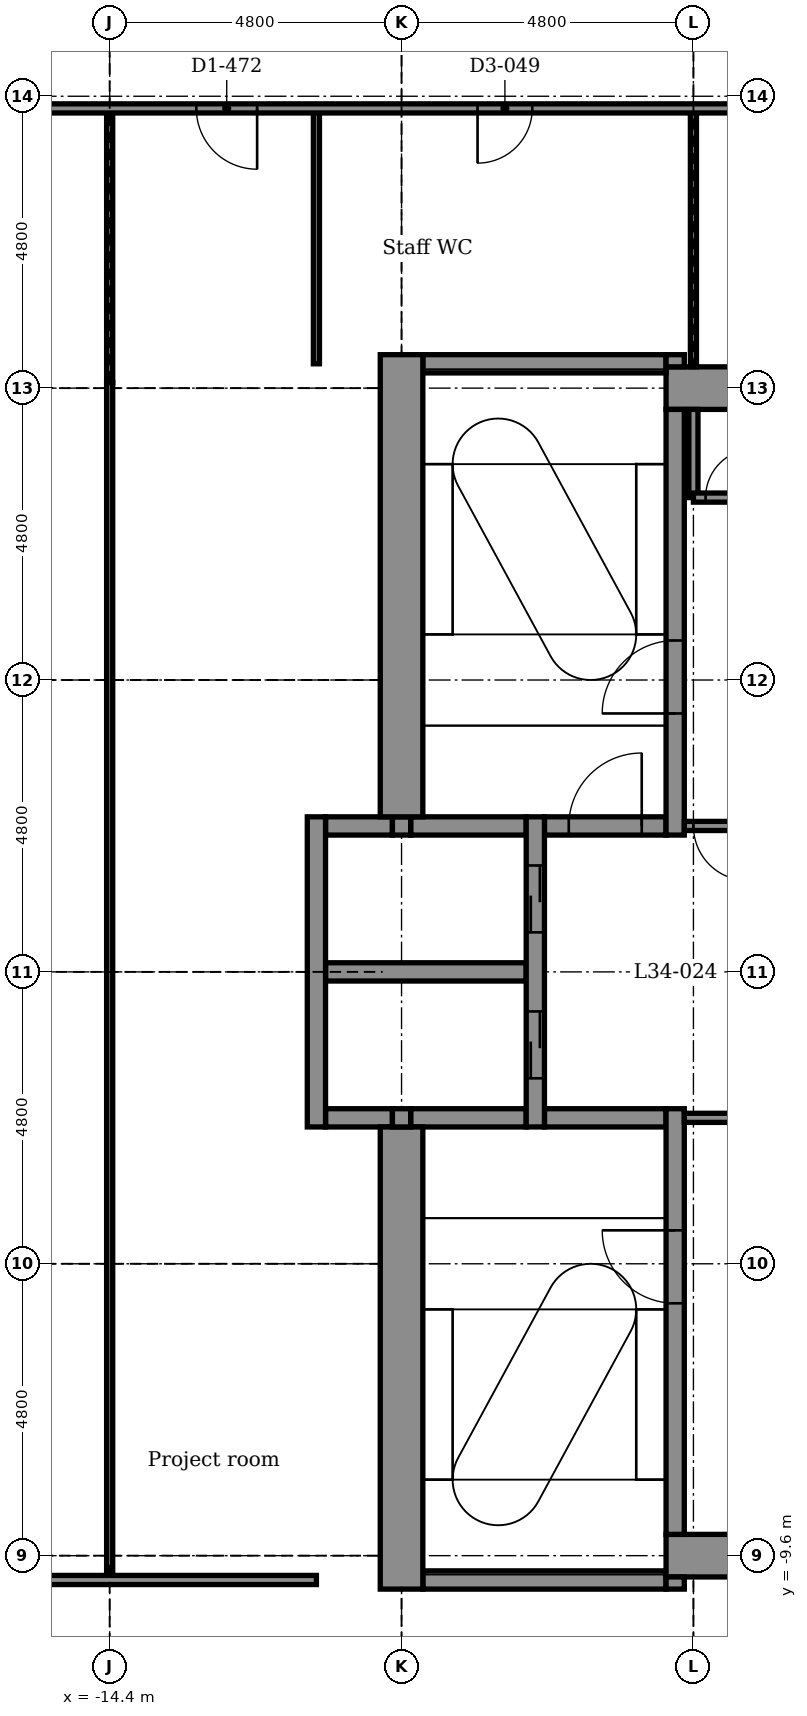
"""IFC4 building model, lengths in metres.
Left out: names, types, materials, properties, quantities, classifications, styles, units other than length and angle.
Written with IfcOpenShell. Run it as: python <this file> out.ifc"""

import sys

from ifc_helpers import new_model, si_unit, direction, frame, frame_2d, origin, place, context, subcontext, project, spatial, rectangle, extrude, element, fill, save


model = new_model("IFC4")
c1 = context("Model", 3, precision=1e-05, world=origin(), true_north=direction((0.0, 1.0)))
c2 = subcontext(c1, "Body", "Model", "MODEL_VIEW")
j1 = project(units=[si_unit("LENGTHUNIT", "METRE"), si_unit("PLANEANGLEUNIT", "RADIAN")], contexts=[c1])
p1 = place(None, origin())
s1 = spatial("IfcSite", under=j1, at=p1, CompositionType="ELEMENT")
p2 = place(p1, origin())
s2 = spatial("IfcBuilding", under=s1, at=p2, CompositionType="ELEMENT")
p3 = place(p2, frame((0.0, 0.0, 166.1)))
s3 = spatial("IfcBuildingStorey", under=s2, at=p3, CompositionType="ELEMENT", Elevation=166.1)
p4 = place(p3, frame((-9.25, -10.0, -0.15), z_axis=(0.0, 0.0, 1.0), x_axis=(1.0, 0.0, 0.0)))
e1 = element("IfcWall", 1, at=p4, inside=s3, PredefinedType="STANDARD", context=c2, shape_type="SweptSolid", body=[
    extrude(rectangle(XDim=4.0, YDim=0.3, at=frame_2d((2.0, 0.0))), origin(), (0.0, 0.0, 1.0), 3.9),
])
p5 = place(p3, frame((-5.25, -9.6, -0.15), z_axis=(0.0, 0.0, 1.0), x_axis=(1.0, 0.0, 0.0)))
e2 = element("IfcWall", 2, at=p5, inside=s3, PredefinedType="SHEAR", context=c2, shape_type="SweptSolid", body=[
    extrude(rectangle(XDim=10.2, YDim=0.7, at=frame_2d((5.1, 0.0))), origin(), (0.0, 0.0, 1.0), 3.9),
])
p6 = place(p5, frame((9.0, 0.0, 0.15)))
e3 = element("IfcOpeningElement", 3, at=p6, cuts=e2, PredefinedType="OPENING", context=c2, shape_type="SweptSolid", body=[
    extrude(rectangle(XDim=0.9, YDim=2.1, at=frame_2d((0.45, 1.05))), frame((0.0, 0.36, 0.0), z_axis=(0.0, -1.0, 0.0), x_axis=(1.0, 0.0, 0.0)), (0.0, 0.0, 1.0), 0.72),
])
p7 = place(p3, frame((-10.85, -2.4, -0.15), z_axis=(0.0, 0.0, 1.0), x_axis=(1.0, 0.0, 0.0)))
e4 = element("IfcWall", 4, at=p7, inside=s3, PredefinedType="STANDARD", context=c2, shape_type="SweptSolid", body=[
    extrude(rectangle(XDim=1.1, YDim=0.3, at=frame_2d((0.55, 0.0))), origin(), (0.0, 0.0, 1.0), 3.9),
])
p8 = place(p3, frame((-9.45, -2.4, -0.15), z_axis=(0.0, 0.0, 1.0), x_axis=(1.0, 0.0, 0.0)))
e5 = element("IfcWall", 5, at=p8, inside=s3, PredefinedType="STANDARD", context=c2, shape_type="SweptSolid", body=[
    extrude(rectangle(XDim=1.9, YDim=0.3, at=frame_2d((0.95, 0.0))), origin(), (0.0, 0.0, 1.0), 3.9),
])
p9 = place(p3, frame((-7.25, -2.4, -0.15), z_axis=(0.0, 0.0, 1.0), x_axis=(1.0, 0.0, 0.0)))
e6 = element("IfcWall", 6, at=p9, inside=s3, PredefinedType="STANDARD", context=c2, shape_type="SweptSolid", body=[
    extrude(rectangle(XDim=2.0, YDim=0.3, at=frame_2d((1.0, 0.0))), origin(), (0.0, 0.0, 1.0), 3.9),
])
p10 = place(p3, frame((-10.85, 0.0, -0.15), z_axis=(0.0, 0.0, 1.0), x_axis=(1.0, 0.0, 0.0)))
e7 = element("IfcWall", 7, at=p10, inside=s3, PredefinedType="STANDARD", context=c2, shape_type="SweptSolid", body=[
    extrude(rectangle(XDim=3.3, YDim=0.3, at=frame_2d((1.65, 0.0))), origin(), (0.0, 0.0, 1.0), 3.9),
])
p11 = place(p3, frame((-10.85, 2.4, -0.15), z_axis=(0.0, 0.0, 1.0), x_axis=(1.0, 0.0, 0.0)))
e8 = element("IfcWall", 8, at=p11, inside=s3, PredefinedType="STANDARD", context=c2, shape_type="SweptSolid", body=[
    extrude(rectangle(XDim=1.1, YDim=0.3, at=frame_2d((0.55, 0.0))), origin(), (0.0, 0.0, 1.0), 3.9),
])
p12 = place(p3, frame((-9.45, 2.4, -0.15), z_axis=(0.0, 0.0, 1.0), x_axis=(1.0, 0.0, 0.0)))
e9 = element("IfcWall", 9, at=p12, inside=s3, PredefinedType="STANDARD", context=c2, shape_type="SweptSolid", body=[
    extrude(rectangle(XDim=1.9, YDim=0.3, at=frame_2d((0.95, 0.0))), origin(), (0.0, 0.0, 1.0), 3.9),
])
p13 = place(p3, frame((-7.25, 2.4, -0.15), z_axis=(0.0, 0.0, 1.0), x_axis=(1.0, 0.0, 0.0)))
e10 = element("IfcWall", 10, at=p13, inside=s3, PredefinedType="STANDARD", context=c2, shape_type="SweptSolid", body=[
    extrude(rectangle(XDim=2.0, YDim=0.3, at=frame_2d((1.0, 0.0))), origin(), (0.0, 0.0, 1.0), 3.9),
])
p14 = place(p13, frame((0.4, 0.0, 0.15)))
e11 = element("IfcOpeningElement", 11, at=p14, cuts=e10, PredefinedType="OPENING", context=c2, shape_type="SweptSolid", body=[
    extrude(rectangle(XDim=1.2, YDim=2.1, at=frame_2d((0.6, 1.05))), frame((0.0, 0.16, 0.0), z_axis=(0.0, -1.0, 0.0), x_axis=(1.0, 0.0, 0.0)), (0.0, 0.0, 1.0), 0.32),
])
p15 = place(p3, frame((-5.25, 9.6, -0.15), z_axis=(0.0, 0.0, 1.0), x_axis=(1.0, 0.0, 0.0)))
e12 = element("IfcWall", 12, at=p15, inside=s3, PredefinedType="SHEAR", context=c2, shape_type="SweptSolid", body=[
    extrude(rectangle(XDim=14.5, YDim=0.7, at=frame_2d((7.25, 0.0))), origin(), (0.0, 0.0, 1.0), 3.9),
])
p16 = place(p15, frame((9.35, 0.0, 0.15)))
e13 = element("IfcOpeningElement", 13, at=p16, cuts=e12, PredefinedType="OPENING", context=c2, shape_type="SweptSolid", body=[
    extrude(rectangle(XDim=1.4, YDim=2.1, at=frame_2d((0.7, 1.05))), frame((0.0, 0.36, 0.0), z_axis=(0.0, -1.0, 0.0), x_axis=(1.0, 0.0, 0.0)), (0.0, 0.0, 1.0), 0.72),
])
p17 = place(p3, frame((-9.25, 10.0, -0.15), z_axis=(0.0, 0.0, 1.0), x_axis=(1.0, 0.0, 0.0)))
e14 = element("IfcWall", 14, at=p17, inside=s3, PredefinedType="STANDARD", context=c2, shape_type="SweptSolid", body=[
    extrude(rectangle(XDim=4.0, YDim=0.3, at=frame_2d((2.0, 0.0))), origin(), (0.0, 0.0, 1.0), 3.9),
])
p18 = place(p3, frame((-11.0, -2.55, -0.15), z_axis=(0.0, 0.0, 1.0), x_axis=(0.0, 1.0, 0.0)))
e15 = element("IfcWall", 15, at=p18, inside=s3, PredefinedType="STANDARD", context=c2, shape_type="SweptSolid", body=[
    extrude(rectangle(XDim=5.1, YDim=0.3, at=frame_2d((2.55, 0.0))), origin(), (0.0, 0.0, 1.0), 3.9),
])
p19 = place(p3, frame((-9.6, -10.15, -0.15), z_axis=(0.0, 0.0, 1.0), x_axis=(0.0, 1.0, 0.0)))
e16 = element("IfcWall", 16, at=p19, inside=s3, PredefinedType="SHEAR", context=c2, shape_type="SweptSolid", body=[
    extrude(rectangle(XDim=7.6, YDim=0.7, at=frame_2d((3.8, 0.0))), origin(), (0.0, 0.0, 1.0), 3.9),
])
for number, where, z_axis, x_axis in (
    (17, (-9.6, -2.55, -0.15), (0.0, 0.0, 1.0), (0.0, 1.0, 0.0)),
    (18, (-9.6, 2.25, -0.15), (0.0, 0.0, 1.0), (0.0, 1.0, 0.0)),
):
    element("IfcWall", number, at=place(p3, frame(where, z_axis=z_axis, x_axis=x_axis)), inside=s3, PredefinedType="STANDARD", context=c2, shape_type="SweptSolid", body=[
        extrude(rectangle(XDim=0.3, YDim=0.3, at=frame_2d((0.15, 0.0))), origin(), (0.0, 0.0, 1.0), 3.9),
    ])
p20 = place(p3, frame((-9.6, 2.55, -0.15), z_axis=(0.0, 0.0, 1.0), x_axis=(0.0, 1.0, 0.0)))
e19 = element("IfcWall", 19, at=p20, inside=s3, PredefinedType="SHEAR", context=c2, shape_type="SweptSolid", body=[
    extrude(rectangle(XDim=7.6, YDim=0.7, at=frame_2d((3.8, 0.0))), origin(), (0.0, 0.0, 1.0), 3.9),
])
p21 = place(p3, frame((-7.4, -2.55, -0.15), z_axis=(0.0, 0.0, 1.0), x_axis=(0.0, 1.0, 0.0)))
e20 = element("IfcWall", 20, at=p21, inside=s3, PredefinedType="STANDARD", context=c2, shape_type="SweptSolid", body=[
    extrude(rectangle(XDim=5.1, YDim=0.3, at=frame_2d((2.55, 0.0))), origin(), (0.0, 0.0, 1.0), 3.9),
])
p22 = place(p21, frame((0.8, 0.0, 0.15)))
e21 = element("IfcOpeningElement", 21, at=p22, cuts=e20, PredefinedType="OPENING", context=c2, shape_type="SweptSolid", body=[
    extrude(rectangle(XDim=1.1, YDim=2.1, at=frame_2d((0.55, 1.05))), frame((0.0, 0.16, 0.0), z_axis=(0.0, -1.0, 0.0), x_axis=(1.0, 0.0, 0.0)), (0.0, 0.0, 1.0), 0.32),
])
p23 = place(p21, frame((3.2, 0.0, 0.15)))
e22 = element("IfcOpeningElement", 22, at=p23, cuts=e20, PredefinedType="OPENING", context=c2, shape_type="SweptSolid", body=[
    extrude(rectangle(XDim=1.1, YDim=2.1, at=frame_2d((0.55, 1.05))), frame((0.0, 0.16, 0.0), z_axis=(0.0, -1.0, 0.0), x_axis=(1.0, 0.0, 0.0)), (0.0, 0.0, 1.0), 0.32),
])
p24 = place(p3, frame((-5.1, -10.15, -0.15), z_axis=(0.0, 0.0, 1.0), x_axis=(0.0, 1.0, 0.0)))
e23 = element("IfcWall", 23, at=p24, inside=s3, PredefinedType="STANDARD", context=c2, shape_type="SweptSolid", body=[
    extrude(rectangle(XDim=0.2, YDim=0.3, at=frame_2d((0.1, 0.0))), origin(), (0.0, 0.0, 1.0), 3.9),
])
p25 = place(p3, frame((-5.1, -9.25, -0.15), z_axis=(0.0, 0.0, 1.0), x_axis=(0.0, 1.0, 0.0)))
e24 = element("IfcWall", 24, at=p25, inside=s3, PredefinedType="STANDARD", context=c2, shape_type="SweptSolid", body=[
    extrude(rectangle(XDim=7.0, YDim=0.3, at=frame_2d((3.5, 0.0))), origin(), (0.0, 0.0, 1.0), 3.9),
])
p26 = place(p25, frame((3.8, 0.0, 0.15)))
e25 = element("IfcOpeningElement", 25, at=p26, cuts=e24, PredefinedType="OPENING", context=c2, shape_type="SweptSolid", body=[
    extrude(rectangle(XDim=1.2, YDim=2.1, at=frame_2d((0.6, 1.05))), frame((0.0, 0.16, 0.0), z_axis=(0.0, -1.0, 0.0), x_axis=(1.0, 0.0, 0.0)), (0.0, 0.0, 1.0), 0.32),
])
p27 = place(p3, frame((-5.1, 2.25, -0.15), z_axis=(0.0, 0.0, 1.0), x_axis=(0.0, 1.0, 0.0)))
e26 = element("IfcWall", 26, at=p27, inside=s3, PredefinedType="STANDARD", context=c2, shape_type="SweptSolid", body=[
    extrude(rectangle(XDim=7.0, YDim=0.3, at=frame_2d((3.5, 0.0))), origin(), (0.0, 0.0, 1.0), 3.9),
])
p28 = place(p27, frame((2.0, 0.0, 0.15)))
e27 = element("IfcOpeningElement", 27, at=p28, cuts=e26, PredefinedType="OPENING", context=c2, shape_type="SweptSolid", body=[
    extrude(rectangle(XDim=1.2, YDim=2.1, at=frame_2d((0.6, 1.05))), frame((0.0, 0.16, 0.0), z_axis=(0.0, -1.0, 0.0), x_axis=(1.0, 0.0, 0.0)), (0.0, 0.0, 1.0), 0.32),
])
p29 = place(p3, frame((-5.1, 9.95, -0.15), z_axis=(0.0, 0.0, 1.0), x_axis=(0.0, 1.0, 0.0)))
e28 = element("IfcWall", 28, at=p29, inside=s3, PredefinedType="STANDARD", context=c2, shape_type="SweptSolid", body=[
    extrude(rectangle(XDim=0.2, YDim=0.3, at=frame_2d((0.1, 0.0))), origin(), (0.0, 0.0, 1.0), 3.9),
])
p30 = place(p3, frame((-4.8, 9.95, 0.0), z_axis=(0.0, 0.0, 1.0), x_axis=(0.0, 1.0, 0.0)))
e29 = element("IfcWall", 29, at=p30, inside=s3, PredefinedType="PARTITIONING", context=c2, shape_type="SweptSolid", body=[
    extrude(rectangle(XDim=4.25, YDim=0.1, at=frame_2d((2.125, 0.0))), origin(), (0.0, 0.0, 1.0), 3.066),
])
p31 = place(p3, frame((-4.8, 7.8, 0.0), z_axis=(0.0, 0.0, 1.0), x_axis=(0.0, 1.0, 0.0)))
e30 = element("IfcWall", 30, at=p31, inside=s3, PredefinedType="PARTITIONING", context=c2, shape_type="SweptSolid", body=[
    extrude(rectangle(XDim=1.45, YDim=0.15, at=frame_2d((0.725, 0.0))), origin(), (0.0, 0.0, 1.0), 3.75),
])
p32 = place(p3, frame((-11.0, 10.0, 0.0), z_axis=(0.0, 0.0, 1.0), x_axis=(0.0, 1.0, 0.0)))
e31 = element("IfcWall", 31, at=p32, inside=s3, PredefinedType="PARTITIONING", context=c2, shape_type="SweptSolid", body=[
    extrude(rectangle(XDim=4.2, YDim=0.1, at=frame_2d((2.1, 0.0))), origin(), (0.0, 0.0, 1.0), 3.75),
])
p33 = place(p3, frame((-14.4, -10.0, 0.0), z_axis=(0.0, 0.0, 1.0), x_axis=(0.0, 1.0, 0.0)))
e32 = element("IfcWall", 32, at=p33, inside=s3, PredefinedType="PARTITIONING", context=c2, shape_type="SweptSolid", body=[
    extrude(rectangle(XDim=19.694, YDim=0.1, at=frame_2d((9.847, 0.0))), origin(), (0.0, 0.0, 1.0), 3.75),
])
p34 = place(p3, frame((-14.4, 9.694, 0.0), z_axis=(0.0, 0.0, 1.0), x_axis=(0.0, 1.0, 0.0)))
e33 = element("IfcWall", 33, at=p34, inside=s3, PredefinedType="PARTITIONING", context=c2, shape_type="SweptSolid", body=[
    extrude(rectangle(XDim=4.506, YDim=0.1, at=frame_2d((2.253, 0.0))), origin(), (0.0, 0.0, 1.0), 3.066),
])
p35 = place(p3, frame((-21.156, -10.0, 0.0), z_axis=(0.0, 0.0, 1.0), x_axis=(1.0, 0.0, 0.0)))
e34 = element("IfcWall", 34, at=p35, inside=s3, PredefinedType="PARTITIONING", context=c2, shape_type="SweptSolid", body=[
    extrude(rectangle(XDim=10.156, YDim=0.15, at=frame_2d((5.078, 0.0))), origin(), (0.0, 0.0, 1.0), 3.75),
])
p36 = place(p35, frame((1.735, 0.0, 0.0)))
e35 = element("IfcOpeningElement", 35, at=p36, cuts=e34, PredefinedType="OPENING", context=c2, shape_type="SweptSolid", body=[
    extrude(rectangle(XDim=1.8, YDim=2.1, at=frame_2d((0.9, 1.05))), frame((0.0, 0.085, 0.0), z_axis=(0.0, -1.0, 0.0), x_axis=(1.0, 0.0, 0.0)), (0.0, 0.0, 1.0), 0.17),
])
p37 = place(p3, frame((-4.8, 7.8, 0.0), z_axis=(0.0, 0.0, 1.0), x_axis=(1.0, 0.0, 0.0)))
e36 = element("IfcWall", 36, at=p37, inside=s3, PredefinedType="PARTITIONING", context=c2, shape_type="SweptSolid", body=[
    extrude(rectangle(XDim=1.05, YDim=0.15, at=frame_2d((0.525, 0.0))), origin(), (0.0, 0.0, 1.0), 3.75),
])
p38 = place(p37, frame((0.2, 0.0, 0.0)))
e37 = element("IfcOpeningElement", 37, at=p38, cuts=e36, PredefinedType="OPENING", context=c2, shape_type="SweptSolid", body=[
    extrude(rectangle(XDim=0.8, YDim=2.1, at=frame_2d((0.4, 1.05))), frame((0.0, 0.085, 0.0), z_axis=(0.0, -1.0, 0.0), x_axis=(1.0, 0.0, 0.0)), (0.0, 0.0, 1.0), 0.17),
])
p39 = place(p3, frame((-18.731, 14.2, 0.0), z_axis=(0.0, 0.0, 1.0), x_axis=(1.0, 0.0, 0.0)))
e38 = element("IfcWall", 38, at=p39, inside=s3, PredefinedType="PARTITIONING", context=c2, shape_type="SweptSolid", body=[
    extrude(rectangle(XDim=22.331, YDim=0.15, at=frame_2d((11.166, 0.0))), origin(), (0.0, 0.0, 1.0), 3.75),
])
p40 = place(p39, frame((10.381, 0.0, 0.0)))
e39 = element("IfcOpeningElement", 39, at=p40, cuts=e38, PredefinedType="OPENING", context=c2, shape_type="SweptSolid", body=[
    extrude(rectangle(XDim=0.9, YDim=2.1, at=frame_2d((0.45, 1.05))), frame((0.0, 0.085, 0.0), z_axis=(0.0, -1.0, 0.0), x_axis=(1.0, 0.0, 0.0)), (0.0, 0.0, 1.0), 0.17),
])
p41 = place(p39, frame((15.881, 0.0, 0.0)))
e40 = element("IfcOpeningElement", 40, at=p41, cuts=e38, PredefinedType="OPENING", context=c2, shape_type="SweptSolid", body=[
    extrude(rectangle(XDim=0.9, YDim=2.1, at=frame_2d((0.45, 1.05))), frame((0.0, 0.085, 0.0), z_axis=(0.0, -1.0, 0.0), x_axis=(1.0, 0.0, 0.0)), (0.0, 0.0, 1.0), 0.17),
])
p42 = place(p39, frame((5.756, 0.0, 0.0)))
e41 = element("IfcOpeningElement", 41, at=p42, cuts=e38, PredefinedType="OPENING", context=c2, shape_type="SweptSolid", body=[
    extrude(rectangle(XDim=1.0, YDim=2.1, at=frame_2d((0.5, 1.05))), frame((0.0, 0.085, 0.0), z_axis=(0.0, -1.0, 0.0), x_axis=(1.0, 0.0, 0.0)), (0.0, 0.0, 1.0), 0.17),
])
p43 = place(p3, frame((-4.95, 2.4, 0.0), z_axis=(0.0, 0.0, 1.0), x_axis=(1.0, 0.0, 0.0)))
e42 = element("IfcWall", 42, at=p43, inside=s3, PredefinedType="PARTITIONING", context=c2, shape_type="SweptSolid", body=[
    extrude(rectangle(XDim=1.2, YDim=0.15, at=frame_2d((0.6, 0.0))), origin(), (0.0, 0.0, 1.0), 3.75),
])
p44 = place(p43, frame((0.15, 0.0, 0.0)))
e43 = element("IfcOpeningElement", 43, at=p44, cuts=e42, PredefinedType="OPENING", context=c2, shape_type="SweptSolid", body=[
    extrude(rectangle(XDim=0.9, YDim=2.1, at=frame_2d((0.45, 1.05))), frame((0.0, 0.085, 0.0), z_axis=(0.0, -1.0, 0.0), x_axis=(1.0, 0.0, 0.0)), (0.0, 0.0, 1.0), 0.17),
])
p45 = place(p3, frame((-4.95, -2.4, 0.0), z_axis=(0.0, 0.0, 1.0), x_axis=(1.0, 0.0, 0.0)))
e44 = element("IfcWall", 44, at=p45, inside=s3, PredefinedType="PARTITIONING", context=c2, shape_type="SweptSolid", body=[
    extrude(rectangle(XDim=1.2, YDim=0.15, at=frame_2d((0.6, 0.0))), origin(), (0.0, 0.0, 1.0), 3.75),
])
p46 = place(p38, origin())
e45 = element("IfcDoor", 45, at=p46, inside=s3, OperationType="SINGLE_SWING_RIGHT", PredefinedType="DOOR", context=c2, shape_type="SweptSolid", body=[
    extrude(rectangle(XDim=0.8, YDim=2.1, at=frame_2d((0.4, 1.05))), frame((0.0, 0.025, 0.0), z_axis=(0.0, -1.0, 0.0), x_axis=(1.0, 0.0, 0.0)), (0.0, 0.0, 1.0), 0.05),
])
fill(e37, e45)
p47 = place(p40, frame((0.9, 0.0, 0.0), z_axis=(0.0, 0.0, 1.0), x_axis=(-1.0, 0.0, 0.0)))
e46 = element("IfcDoor", 46, at=p47, inside=s3, OperationType="SINGLE_SWING_LEFT", PredefinedType="DOOR", context=c2, shape_type="SweptSolid", body=[
    extrude(rectangle(XDim=0.9, YDim=2.1, at=frame_2d((0.45, 1.05))), frame((0.0, 0.025, 0.0), z_axis=(0.0, -1.0, 0.0), x_axis=(1.0, 0.0, 0.0)), (0.0, 0.0, 1.0), 0.05),
])
fill(e39, e46)
p48 = place(p42, frame((1.0, 0.0, 0.0), z_axis=(0.0, 0.0, 1.0), x_axis=(-1.0, 0.0, 0.0)))
e47 = element("IfcDoor", 47, at=p48, inside=s3, OperationType="SINGLE_SWING_RIGHT", PredefinedType="DOOR", context=c2, shape_type="SweptSolid", body=[
    extrude(rectangle(XDim=1.0, YDim=2.1, at=frame_2d((0.5, 1.05))), frame((0.0, 0.025, 0.0), z_axis=(0.0, -1.0, 0.0), x_axis=(1.0, 0.0, 0.0)), (0.0, 0.0, 1.0), 0.05),
])
fill(e41, e47)
p49 = place(p22, origin())
e48 = element("IfcDoor", 48, at=p49, inside=s3, OperationType="DOUBLE_DOOR_SLIDING", PredefinedType="DOOR", context=c2, shape_type="SweptSolid", body=[
    extrude(rectangle(XDim=1.1, YDim=2.1, at=frame_2d((0.55, 1.05))), frame((0.0, 0.025, 0.0), z_axis=(0.0, -1.0, 0.0), x_axis=(1.0, 0.0, 0.0)), (0.0, 0.0, 1.0), 0.05),
])
fill(e21, e48)
p50 = place(p23, origin())
e49 = element("IfcDoor", 49, at=p50, inside=s3, OperationType="DOUBLE_DOOR_SLIDING", PredefinedType="DOOR", context=c2, shape_type="SweptSolid", body=[
    extrude(rectangle(XDim=1.1, YDim=2.1, at=frame_2d((0.55, 1.05))), frame((0.0, 0.025, 0.0), z_axis=(0.0, -1.0, 0.0), x_axis=(1.0, 0.0, 0.0)), (0.0, 0.0, 1.0), 0.05),
])
fill(e22, e49)
p51 = place(p28, origin())
e50 = element("IfcDoor", 50, at=p51, inside=s3, OperationType="SINGLE_SWING_LEFT", PredefinedType="DOOR", context=c2, shape_type="SweptSolid", body=[
    extrude(rectangle(XDim=1.2, YDim=2.1, at=frame_2d((0.6, 1.05))), frame((0.0, 0.025, 0.0), z_axis=(0.0, -1.0, 0.0), x_axis=(1.0, 0.0, 0.0)), (0.0, 0.0, 1.0), 0.05),
])
fill(e27, e50)
p52 = place(p26, origin())
e51 = element("IfcDoor", 51, at=p52, inside=s3, OperationType="SINGLE_SWING_RIGHT", PredefinedType="DOOR", context=c2, shape_type="SweptSolid", body=[
    extrude(rectangle(XDim=1.2, YDim=2.1, at=frame_2d((0.6, 1.05))), frame((0.0, 0.025, 0.0), z_axis=(0.0, -1.0, 0.0), x_axis=(1.0, 0.0, 0.0)), (0.0, 0.0, 1.0), 0.05),
])
fill(e25, e51)
p53 = place(p44, frame((0.9, 0.0, 0.0), z_axis=(0.0, 0.0, 1.0), x_axis=(-1.0, 0.0, 0.0)))
e52 = element("IfcDoor", 52, at=p53, inside=s3, OperationType="SINGLE_SWING_RIGHT", PredefinedType="DOOR", context=c2, shape_type="SweptSolid", body=[
    extrude(rectangle(XDim=0.9, YDim=2.1, at=frame_2d((0.45, 1.05))), frame((0.0, 0.025, 0.0), z_axis=(0.0, -1.0, 0.0), x_axis=(1.0, 0.0, 0.0)), (0.0, 0.0, 1.0), 0.05),
])
fill(e43, e52)
p54 = place(p14, origin())
e53 = element("IfcDoor", 53, at=p54, inside=s3, OperationType="SINGLE_SWING_RIGHT", PredefinedType="DOOR", context=c2, shape_type="SweptSolid", body=[
    extrude(rectangle(XDim=1.2, YDim=2.1, at=frame_2d((0.6, 1.05))), frame((0.0, 0.025, 0.0), z_axis=(0.0, -1.0, 0.0), x_axis=(1.0, 0.0, 0.0)), (0.0, 0.0, 1.0), 0.05),
])
fill(e11, e53)
save(model, sys.argv[1])
